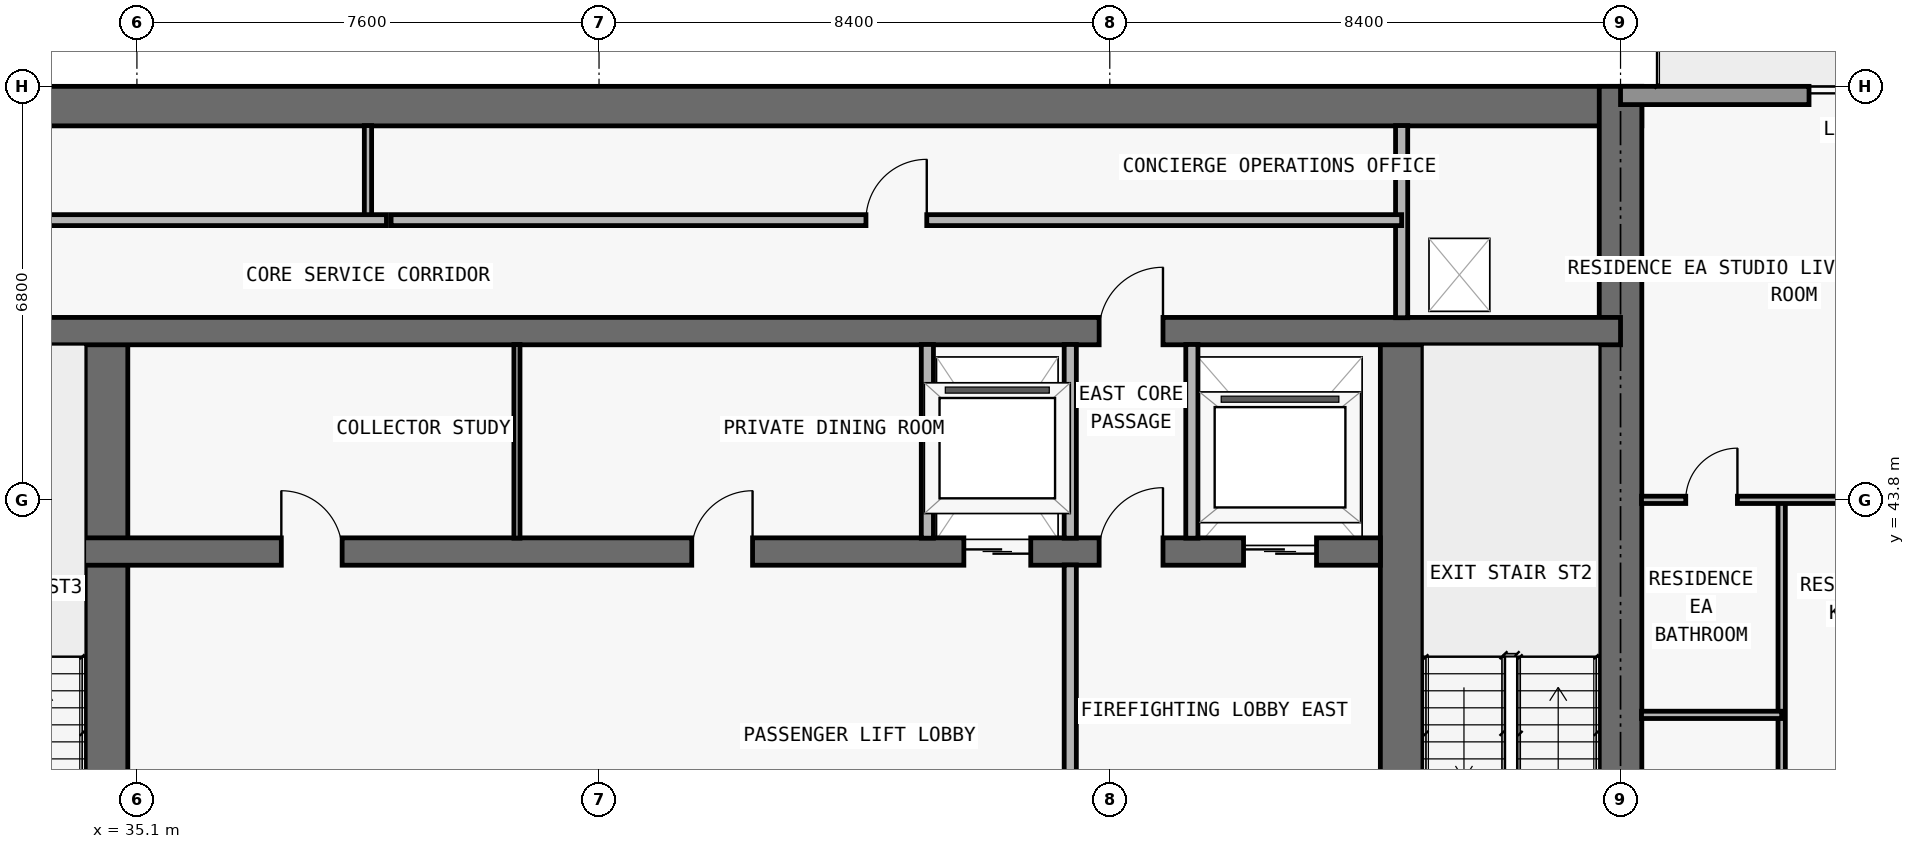
"""IFC4 building model, lengths in metres.
Left out: names, types, materials, properties, quantities, classifications, styles, units other than length and angle.
Written with IfcOpenShell. Run it as: python <this file> out.ifc"""

import sys

from ifc_helpers import new_model, si_unit, direction, frame, frame_2d, origin, place, context, subcontext, project, spatial, rectangle, extrude, element, fill, save


model = new_model("IFC4")
c1 = context("Model", 3, precision=1e-05, world=origin(), true_north=direction((0.0, 1.0)))
c2 = subcontext(c1, "Body", "Model", "MODEL_VIEW")
j1 = project(units=[si_unit("LENGTHUNIT", "METRE"), si_unit("PLANEANGLEUNIT", "RADIAN")], contexts=[c1])
p1 = place(None, origin())
s1 = spatial("IfcSite", under=j1, at=p1, CompositionType="ELEMENT")
p2 = place(p1, origin())
s2 = spatial("IfcBuilding", under=s1, at=p2, CompositionType="ELEMENT")
p3 = place(p2, frame((0.0, 0.0, 214.8)))
s3 = spatial("IfcBuildingStorey", under=s2, at=p3, CompositionType="ELEMENT", Elevation=214.8)
p4 = place(p3, frame((17.95, 50.275, 0.0), z_axis=(0.0, 0.0, 1.0), x_axis=(1.0, 0.0, 0.0)))
e1 = element("IfcWall", 1, at=p4, inside=s3, PredefinedType="SHEAR", context=c2, shape_type="SweptSolid", body=[
    extrude(rectangle(XDim=41.9, YDim=0.65, at=frame_2d((20.95, 0.0))), origin(), (0.0, 0.0, 1.0), 3.05),
])
p5 = place(p3, frame((59.5, 36.65, 0.0), z_axis=(0.0, 0.0, 1.0), x_axis=(0.0, 1.0, 0.0)))
e2 = element("IfcWall", 2, at=p5, inside=s3, PredefinedType="SHEAR", context=c2, shape_type="SweptSolid", body=[
    extrude(rectangle(XDim=13.95, YDim=0.7, at=frame_2d((6.975, 0.0))), origin(), (0.0, 0.0, 1.0), 3.05),
])
p6 = place(p3, frame((55.9, 37.0, 0.0), z_axis=(0.0, 0.0, 1.0), x_axis=(0.0, 1.0, 0.0)))
e3 = element("IfcWall", 3, at=p6, inside=s3, PredefinedType="SHEAR", context=c2, shape_type="SweptSolid", body=[
    extrude(rectangle(XDim=9.575, YDim=0.7, at=frame_2d((4.788, 0.0))), origin(), (0.0, 0.0, 1.0), 3.05),
])
p7 = place(p6, frame((0.55, 0.0, 0.0)))
e4 = element("IfcOpeningElement", 4, at=p7, cuts=e3, PredefinedType="OPENING", context=c2, shape_type="SweptSolid", body=[
    extrude(rectangle(XDim=1.1, YDim=2.15, at=frame_2d((0.55, 1.075))), frame((0.0, 0.36, 0.0), z_axis=(0.0, -1.0, 0.0), x_axis=(1.0, 0.0, 0.0)), (0.0, 0.0, 1.0), 0.72),
])
p8 = place(p3, frame((34.6, 37.0, 0.0), z_axis=(0.0, 0.0, 1.0), x_axis=(0.0, 1.0, 0.0)))
e5 = element("IfcWall", 5, at=p8, inside=s3, PredefinedType="SHEAR", context=c2, shape_type="SweptSolid", body=[
    extrude(rectangle(XDim=9.575, YDim=0.7, at=frame_2d((4.788, 0.0))), origin(), (0.0, 0.0, 1.0), 3.05),
])
p9 = place(p3, frame((22.25, 42.95, 0.0), z_axis=(0.0, 0.0, 1.0), x_axis=(1.0, 0.0, 0.0)))
e6 = element("IfcWall", 6, at=p9, inside=s3, PredefinedType="SHEAR", context=c2, shape_type="SweptSolid", body=[
    extrude(rectangle(XDim=33.3, YDim=0.45, at=frame_2d((16.65, 0.0))), origin(), (0.0, 0.0, 1.0), 3.05),
])
p10 = place(p9, frame((1.05, 0.0, 0.0)))
e7 = element("IfcOpeningElement", 7, at=p10, cuts=e6, PredefinedType="OPENING", context=c2, shape_type="SweptSolid", body=[
    extrude(rectangle(XDim=1.2, YDim=2.2, at=frame_2d((0.6, 1.1))), frame((0.0, 0.235, 0.0), z_axis=(0.0, -1.0, 0.0), x_axis=(1.0, 0.0, 0.0)), (0.0, 0.0, 1.0), 0.47),
])
p11 = place(p9, frame((31.05, 0.0, 0.0)))
e8 = element("IfcOpeningElement", 8, at=p11, cuts=e6, PredefinedType="OPENING", context=c2, shape_type="SweptSolid", body=[
    extrude(rectangle(XDim=1.2, YDim=2.2, at=frame_2d((0.6, 1.1))), frame((0.0, 0.235, 0.0), z_axis=(0.0, -1.0, 0.0), x_axis=(1.0, 0.0, 0.0)), (0.0, 0.0, 1.0), 0.47),
])
p12 = place(p9, frame((26.45, 0.0, 0.0)))
e9 = element("IfcOpeningElement", 9, at=p12, cuts=e6, PredefinedType="OPENING", context=c2, shape_type="SweptSolid", body=[
    extrude(rectangle(XDim=1.1, YDim=2.2, at=frame_2d((0.55, 1.1))), frame((0.0, 0.235, 0.0), z_axis=(0.0, -1.0, 0.0), x_axis=(1.0, 0.0, 0.0)), (0.0, 0.0, 1.0), 0.47),
])
p13 = place(p9, frame((5.95, 0.0, 0.0)))
e10 = element("IfcOpeningElement", 10, at=p13, cuts=e6, PredefinedType="OPENING", context=c2, shape_type="SweptSolid", body=[
    extrude(rectangle(XDim=1.1, YDim=2.2, at=frame_2d((0.55, 1.1))), frame((0.0, 0.235, 0.0), z_axis=(0.0, -1.0, 0.0), x_axis=(1.0, 0.0, 0.0)), (0.0, 0.0, 1.0), 0.47),
])
p14 = place(p9, frame((3.625, 0.0, 0.0)))
e11 = element("IfcOpeningElement", 11, at=p14, cuts=e6, PredefinedType="OPENING", context=c2, shape_type="SweptSolid", body=[
    extrude(rectangle(XDim=1.05, YDim=2.15, at=frame_2d((0.525, 1.075))), frame((0.0, 0.235, 0.0), z_axis=(0.0, -1.0, 0.0), x_axis=(1.0, 0.0, 0.0)), (0.0, 0.0, 1.0), 0.47),
])
p15 = place(p9, frame((28.675, 0.0, 0.0)))
e12 = element("IfcOpeningElement", 12, at=p15, cuts=e6, PredefinedType="OPENING", context=c2, shape_type="SweptSolid", body=[
    extrude(rectangle(XDim=1.05, YDim=2.15, at=frame_2d((0.525, 1.075))), frame((0.0, 0.235, 0.0), z_axis=(0.0, -1.0, 0.0), x_axis=(1.0, 0.0, 0.0)), (0.0, 0.0, 1.0), 0.47),
])
p16 = place(p9, frame((15.225, 0.0, 0.0)))
e13 = element("IfcOpeningElement", 13, at=p16, cuts=e6, PredefinedType="OPENING", context=c2, shape_type="SweptSolid", body=[
    extrude(rectangle(XDim=1.0, YDim=2.2, at=frame_2d((0.5, 1.1))), frame((0.0, 0.235, 0.0), z_axis=(0.0, -1.0, 0.0), x_axis=(1.0, 0.0, 0.0)), (0.0, 0.0, 1.0), 0.47),
])
p17 = place(p9, frame((21.975, 0.0, 0.0)))
e14 = element("IfcOpeningElement", 14, at=p17, cuts=e6, PredefinedType="OPENING", context=c2, shape_type="SweptSolid", body=[
    extrude(rectangle(XDim=1.0, YDim=2.2, at=frame_2d((0.5, 1.1))), frame((0.0, 0.235, 0.0), z_axis=(0.0, -1.0, 0.0), x_axis=(1.0, 0.0, 0.0)), (0.0, 0.0, 1.0), 0.47),
])
p18 = place(p3, frame((18.3, 46.575, 0.0), z_axis=(0.0, 0.0, 1.0), x_axis=(1.0, 0.0, 0.0)))
e15 = element("IfcWall", 15, at=p18, inside=s3, PredefinedType="SHEAR", context=c2, shape_type="SweptSolid", body=[
    extrude(rectangle(XDim=41.2, YDim=0.45, at=frame_2d((20.6, 0.0))), origin(), (0.0, 0.0, 1.0), 3.05),
])
p19 = place(p18, frame((7.575, 0.0, 0.0)))
e16 = element("IfcOpeningElement", 16, at=p19, cuts=e15, PredefinedType="OPENING", context=c2, shape_type="SweptSolid", body=[
    extrude(rectangle(XDim=1.05, YDim=2.15, at=frame_2d((0.525, 1.075))), frame((0.0, 0.235, 0.0), z_axis=(0.0, -1.0, 0.0), x_axis=(1.0, 0.0, 0.0)), (0.0, 0.0, 1.0), 0.47),
])
p20 = place(p18, frame((32.625, 0.0, 0.0)))
e17 = element("IfcOpeningElement", 17, at=p20, cuts=e15, PredefinedType="OPENING", context=c2, shape_type="SweptSolid", body=[
    extrude(rectangle(XDim=1.05, YDim=2.15, at=frame_2d((0.525, 1.075))), frame((0.0, 0.235, 0.0), z_axis=(0.0, -1.0, 0.0), x_axis=(1.0, 0.0, 0.0)), (0.0, 0.0, 1.0), 0.47),
])
p21 = place(p3, frame((59.5, 50.45, 0.0), z_axis=(0.0, 0.0, 1.0), x_axis=(1.0, 0.0, 0.0)))
e18 = element("IfcWall", 18, at=p21, inside=s3, PredefinedType="STANDARD", context=c2, shape_type="SweptSolid", body=[
    extrude(rectangle(XDim=8.2, YDim=0.3, at=frame_2d((4.1, 0.0))), origin(), (0.0, 0.0, 1.0), 3.05),
])
p22 = place(p21, frame((3.1, 0.0, 0.0)))
e19 = element("IfcOpeningElement", 19, at=p22, cuts=e18, PredefinedType="OPENING", context=c2, shape_type="SweptSolid", body=[
    extrude(rectangle(XDim=2.0, YDim=2.3, at=frame_2d((1.0, 1.15))), frame((0.0, 0.16, 0.0), z_axis=(0.0, -1.0, 0.0), x_axis=(1.0, 0.0, 0.0)), (0.0, 0.0, 1.0), 0.32),
])
p23 = place(p3, frame((38.9, 48.4, 0.0), z_axis=(0.0, 0.0, 1.0), x_axis=(0.0, 1.0, 0.0)))
e20 = element("IfcWall", 20, at=p23, inside=s3, PredefinedType="PARTITIONING", context=c2, shape_type="SweptSolid", body=[
    extrude(rectangle(XDim=1.555, YDim=0.12, at=frame_2d((0.778, 0.0))), origin(), (0.0, 0.0, 1.0), 3.05),
])
p24 = place(p3, frame((41.35, 43.17, 0.0), z_axis=(0.0, 0.0, 1.0), x_axis=(0.0, 1.0, 0.0)))
e21 = element("IfcWall", 21, at=p24, inside=s3, PredefinedType="MOVABLE", context=c2, shape_type="SweptSolid", body=[
    extrude(rectangle(XDim=3.185, YDim=0.1, at=frame_2d((1.593, 0.0))), origin(), (0.0, 0.0, 1.0), 3.05),
])
p25 = place(p3, frame((48.1, 43.17, 0.0), z_axis=(0.0, 0.0, 1.0), x_axis=(0.0, 1.0, 0.0)))
e22 = element("IfcWall", 22, at=p25, inside=s3, PredefinedType="PARTITIONING", context=c2, shape_type="SweptSolid", body=[
    extrude(rectangle(XDim=3.185, YDim=0.2, at=frame_2d((1.593, 0.0))), origin(), (0.0, 0.0, 1.0), 3.05),
])
p26 = place(p3, frame((50.45, 37.345, 0.0), z_axis=(0.0, 0.0, 1.0), x_axis=(0.0, 1.0, 0.0)))
e23 = element("IfcWall", 23, at=p26, inside=s3, PredefinedType="PARTITIONING", context=c2, shape_type="SweptSolid", body=[
    extrude(rectangle(XDim=5.385, YDim=0.2, at=frame_2d((2.692, 0.0))), origin(), (0.0, 0.0, 1.0), 3.05),
])
for number, where, z_axis, x_axis in (
    (24, (50.45, 43.17, 0.0), (0.0, 0.0, 1.0), (0.0, 1.0, 0.0)),
    (25, (52.45, 43.17, 0.0), (0.0, 0.0, 1.0), (0.0, 1.0, 0.0)),
):
    element("IfcWall", number, at=place(p3, frame(where, z_axis=z_axis, x_axis=x_axis)), inside=s3, PredefinedType="PARTITIONING", context=c2, shape_type="SweptSolid", body=[
        extrude(rectangle(XDim=3.185, YDim=0.2, at=frame_2d((1.593, 0.0))), origin(), (0.0, 0.0, 1.0), 3.05),
    ])
p27 = place(p3, frame((55.9, 46.795, 0.0), z_axis=(0.0, 0.0, 1.0), x_axis=(0.0, 1.0, 0.0)))
e26 = element("IfcWall", 26, at=p27, inside=s3, PredefinedType="PARTITIONING", context=c2, shape_type="SweptSolid", body=[
    extrude(rectangle(XDim=3.16, YDim=0.2, at=frame_2d((1.58, 0.0))), origin(), (0.0, 0.0, 1.0), 3.05),
])
p28 = place(p3, frame((62.15, 37.0, 0.0), z_axis=(0.0, 0.0, 1.0), x_axis=(0.0, 1.0, 0.0)))
e27 = element("IfcWall", 27, at=p28, inside=s3, PredefinedType="PARTITIONING", context=c2, shape_type="SweptSolid", body=[
    extrude(rectangle(XDim=6.8, YDim=0.12, at=frame_2d((3.4, 0.0))), origin(), (0.0, 0.0, 1.0), 2.578),
])
p29 = place(p28, frame((1.207, 0.0, 0.0)))
e28 = element("IfcOpeningElement", 28, at=p29, cuts=e27, PredefinedType="OPENING", context=c2, shape_type="SweptSolid", body=[
    extrude(rectangle(XDim=0.85, YDim=2.1, at=frame_2d((0.425, 1.05))), frame((0.0, 0.07, 0.0), z_axis=(0.0, -1.0, 0.0), x_axis=(1.0, 0.0, 0.0)), (0.0, 0.0, 1.0), 0.14),
])
p30 = place(p3, frame((59.845, 40.264, 0.0), z_axis=(0.0, 0.0, 1.0), x_axis=(1.0, 0.0, 0.0)))
e29 = element("IfcWall", 29, at=p30, inside=s3, PredefinedType="PARTITIONING", context=c2, shape_type="SweptSolid", body=[
    extrude(rectangle(XDim=2.305, YDim=0.12, at=frame_2d((1.152, 0.0))), origin(), (0.0, 0.0, 1.0), 3.05),
])
p31 = place(p3, frame((59.845, 43.8, 0.0), z_axis=(0.0, 0.0, 1.0), x_axis=(1.0, 0.0, 0.0)))
e30 = element("IfcWall", 30, at=p31, inside=s3, PredefinedType="PARTITIONING", context=c2, shape_type="SweptSolid", body=[
    extrude(rectangle(XDim=11.56, YDim=0.12, at=frame_2d((5.78, 0.0))), origin(), (0.0, 0.0, 1.0), 2.418),
])
p32 = place(p31, frame((3.409, 0.0, 0.0)))
e31 = element("IfcOpeningElement", 31, at=p32, cuts=e30, PredefinedType="OPENING", context=c2, shape_type="SweptSolid", body=[
    extrude(rectangle(XDim=0.9, YDim=2.15, at=frame_2d((0.45, 1.075))), frame((0.0, 0.07, 0.0), z_axis=(0.0, -1.0, 0.0), x_axis=(1.0, 0.0, 0.0)), (0.0, 0.0, 1.0), 0.14),
])
p33 = place(p31, frame((0.728, 0.0, 0.0)))
e32 = element("IfcOpeningElement", 32, at=p33, cuts=e30, PredefinedType="OPENING", context=c2, shape_type="SweptSolid", body=[
    extrude(rectangle(XDim=0.85, YDim=2.1, at=frame_2d((0.425, 1.05))), frame((0.0, 0.07, 0.0), z_axis=(0.0, -1.0, 0.0), x_axis=(1.0, 0.0, 0.0)), (0.0, 0.0, 1.0), 0.14),
])
p34 = place(p3, frame((21.9, 48.4, 0.0), z_axis=(0.0, 0.0, 1.0), x_axis=(1.0, 0.0, 0.0)))
e33 = element("IfcWall", 33, at=p34, inside=s3, PredefinedType="PARTITIONING", context=c2, shape_type="SweptSolid", body=[
    extrude(rectangle(XDim=17.304, YDim=0.18, at=frame_2d((8.652, 0.0))), origin(), (0.0, 0.0, 1.0), 3.05),
])
p35 = place(p34, frame((8.0, 0.0, 0.0)))
e34 = element("IfcOpeningElement", 34, at=p35, cuts=e33, PredefinedType="OPENING", context=c2, shape_type="SweptSolid", body=[
    extrude(rectangle(XDim=1.0, YDim=2.2, at=frame_2d((0.5, 1.1))), frame((0.0, 0.1, 0.0), z_axis=(0.0, -1.0, 0.0), x_axis=(1.0, 0.0, 0.0)), (0.0, 0.0, 1.0), 0.2),
])
p36 = place(p3, frame((39.28, 48.4, 0.0), z_axis=(0.0, 0.0, 1.0), x_axis=(1.0, 0.0, 0.0)))
e35 = element("IfcWall", 35, at=p36, inside=s3, PredefinedType="PARTITIONING", context=c2, shape_type="SweptSolid", body=[
    extrude(rectangle(XDim=16.62, YDim=0.18, at=frame_2d((8.31, 0.0))), origin(), (0.0, 0.0, 1.0), 3.05),
])
p37 = place(p36, frame((7.81, 0.0, 0.0)))
e36 = element("IfcOpeningElement", 36, at=p37, cuts=e35, PredefinedType="OPENING", context=c2, shape_type="SweptSolid", body=[
    extrude(rectangle(XDim=1.0, YDim=2.2, at=frame_2d((0.5, 1.1))), frame((0.0, 0.1, 0.0), z_axis=(0.0, -1.0, 0.0), x_axis=(1.0, 0.0, 0.0)), (0.0, 0.0, 1.0), 0.2),
])
p38 = place(p22, origin())
e37 = element("IfcDoor", 37, at=p38, inside=s3, OperationType="DOUBLE_DOOR_SLIDING", PredefinedType="DOOR", context=c2, shape_type="SweptSolid", body=[
    extrude(rectangle(XDim=2.0, YDim=2.3, at=frame_2d((1.0, 1.15))), frame((0.0, 0.025, 0.0), z_axis=(0.0, -1.0, 0.0), x_axis=(1.0, 0.0, 0.0)), (0.0, 0.0, 1.0), 0.05),
])
fill(e19, e37)
p39 = place(p11, origin())
e38 = element("IfcDoor", 38, at=p39, inside=s3, OperationType="DOUBLE_DOOR_SLIDING", PredefinedType="DOOR", context=c2, shape_type="SweptSolid", body=[
    extrude(rectangle(XDim=1.2, YDim=2.2, at=frame_2d((0.6, 1.1))), frame((0.0, 0.025, 0.0), z_axis=(0.0, -1.0, 0.0), x_axis=(1.0, 0.0, 0.0)), (0.0, 0.0, 1.0), 0.05),
])
fill(e8, e38)
p40 = place(p12, origin())
e39 = element("IfcDoor", 39, at=p40, inside=s3, OperationType="DOUBLE_DOOR_SLIDING", PredefinedType="DOOR", context=c2, shape_type="SweptSolid", body=[
    extrude(rectangle(XDim=1.1, YDim=2.2, at=frame_2d((0.55, 1.1))), frame((0.0, 0.025, 0.0), z_axis=(0.0, -1.0, 0.0), x_axis=(1.0, 0.0, 0.0)), (0.0, 0.0, 1.0), 0.05),
])
fill(e9, e39)
p41 = place(p15, origin())
e40 = element("IfcDoor", 40, at=p41, inside=s3, OperationType="SINGLE_SWING_RIGHT", PredefinedType="DOOR", context=c2, shape_type="SweptSolid", body=[
    extrude(rectangle(XDim=1.05, YDim=2.15, at=frame_2d((0.525, 1.075))), frame((0.0, 0.025, 0.0), z_axis=(0.0, -1.0, 0.0), x_axis=(1.0, 0.0, 0.0)), (0.0, 0.0, 1.0), 0.05),
])
fill(e12, e40)
p42 = place(p16, origin())
e41 = element("IfcDoor", 41, at=p42, inside=s3, OperationType="SINGLE_SWING_LEFT", PredefinedType="DOOR", context=c2, shape_type="SweptSolid", body=[
    extrude(rectangle(XDim=1.0, YDim=2.2, at=frame_2d((0.5, 1.1))), frame((0.0, 0.025, 0.0), z_axis=(0.0, -1.0, 0.0), x_axis=(1.0, 0.0, 0.0)), (0.0, 0.0, 1.0), 0.05),
])
fill(e13, e41)
p43 = place(p17, origin())
e42 = element("IfcDoor", 42, at=p43, inside=s3, OperationType="SINGLE_SWING_RIGHT", PredefinedType="DOOR", context=c2, shape_type="SweptSolid", body=[
    extrude(rectangle(XDim=1.0, YDim=2.2, at=frame_2d((0.5, 1.1))), frame((0.0, 0.025, 0.0), z_axis=(0.0, -1.0, 0.0), x_axis=(1.0, 0.0, 0.0)), (0.0, 0.0, 1.0), 0.05),
])
fill(e14, e42)
p44 = place(p20, origin())
e43 = element("IfcDoor", 43, at=p44, inside=s3, OperationType="SINGLE_SWING_RIGHT", PredefinedType="DOOR", context=c2, shape_type="SweptSolid", body=[
    extrude(rectangle(XDim=1.05, YDim=2.15, at=frame_2d((0.525, 1.075))), frame((0.0, 0.025, 0.0), z_axis=(0.0, -1.0, 0.0), x_axis=(1.0, 0.0, 0.0)), (0.0, 0.0, 1.0), 0.05),
])
fill(e17, e43)
p45 = place(p37, origin())
e44 = element("IfcDoor", 44, at=p45, inside=s3, OperationType="SINGLE_SWING_RIGHT", PredefinedType="DOOR", context=c2, shape_type="SweptSolid", body=[
    extrude(rectangle(XDim=1.0, YDim=2.2, at=frame_2d((0.5, 1.1))), frame((0.0, 0.025, 0.0), z_axis=(0.0, -1.0, 0.0), x_axis=(1.0, 0.0, 0.0)), (0.0, 0.0, 1.0), 0.05),
])
fill(e36, e44)
p46 = place(p33, origin())
e45 = element("IfcDoor", 45, at=p46, inside=s3, OperationType="SINGLE_SWING_RIGHT", PredefinedType="DOOR", context=c2, shape_type="SweptSolid", body=[
    extrude(rectangle(XDim=0.85, YDim=2.1, at=frame_2d((0.425, 1.05))), frame((0.0, 0.025, 0.0), z_axis=(0.0, -1.0, 0.0), x_axis=(1.0, 0.0, 0.0)), (0.0, 0.0, 1.0), 0.05),
])
fill(e32, e45)
save(model, sys.argv[1])
